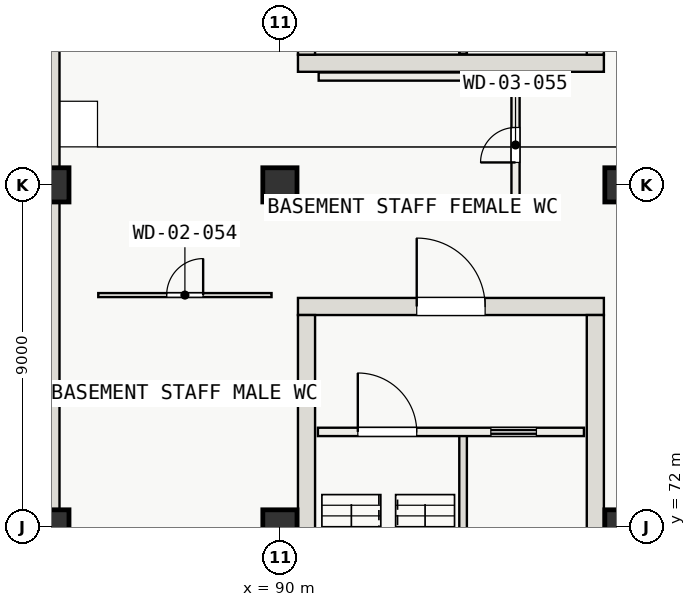
"""IFC4 building model, lengths in metres.
Left out: names, types, materials, properties, quantities, classifications, styles, units other than length and angle.
Written with IfcOpenShell. Run it as: python <this file> out.ifc"""

import sys

from ifc_helpers import new_model, si_unit, direction, frame, frame_2d, origin, origin_2d, place, context, subcontext, project, spatial, rectangle, extrude, element, fill, save


model = new_model("IFC4")
c1 = context("Model", 3, precision=1e-05, world=origin(), true_north=direction((0.0, 1.0)))
c2 = subcontext(c1, "Body", "Model", "MODEL_VIEW")
j1 = project(units=[si_unit("LENGTHUNIT", "METRE"), si_unit("PLANEANGLEUNIT", "RADIAN")], contexts=[c1])
p1 = place(None, origin())
s1 = spatial("IfcSite", under=j1, at=p1, CompositionType="ELEMENT")
p2 = place(p1, origin())
s2 = spatial("IfcBuilding", under=s1, at=p2, CompositionType="ELEMENT")
p3 = place(p2, frame((0.0, 0.0, -4.8)))
s3 = spatial("IfcBuildingStorey", under=s2, at=p3, CompositionType="ELEMENT", Elevation=-4.8)
p4 = place(p3, frame((90.475, 84.2, -0.45), z_axis=(0.0, 0.0, 1.0), x_axis=(1.0, 0.0, 0.0)))
e1 = element("IfcWall", 1, at=p4, inside=s3, PredefinedType="SHEAR", context=c2, shape_type="SweptSolid", body=[
    extrude(rectangle(XDim=8.05, YDim=0.45, at=frame_2d((4.025, 0.0))), origin(), (0.0, 0.0, 1.0), 5.25),
])
for number, where, z_axis, x_axis in (
    (2, (90.7, 84.425, -0.45), (0.0, 0.0, 1.0), (0.0, 1.0, 0.0)),
    (3, (98.3, 84.425, -0.45), (0.0, 0.0, 1.0), (0.0, 1.0, 0.0)),
):
    element("IfcWall", number, at=place(p3, frame(where, z_axis=z_axis, x_axis=x_axis)), inside=s3, PredefinedType="SHEAR", context=c2, shape_type="SweptSolid", body=[
        extrude(rectangle(XDim=11.15, YDim=0.45, at=frame_2d((5.575, 0.0))), origin(), (0.0, 0.0, 1.0), 5.25),
    ])
p5 = place(p3, frame((90.475, 77.8, -0.45), z_axis=(0.0, 0.0, 1.0), x_axis=(1.0, 0.0, 0.0)))
e4 = element("IfcWall", 4, at=p5, inside=s3, PredefinedType="SHEAR", context=c2, shape_type="SweptSolid", body=[
    extrude(rectangle(XDim=8.05, YDim=0.45, at=frame_2d((4.025, 0.0))), origin(), (0.0, 0.0, 1.0), 5.25),
])
p6 = place(p5, frame((3.125, 0.0, 0.45)))
e5 = element("IfcOpeningElement", 5, at=p6, cuts=e4, PredefinedType="OPENING", context=c2, shape_type="SweptSolid", body=[
    extrude(rectangle(XDim=1.8, YDim=2.3, at=frame_2d((0.9, 1.15))), frame((0.0, 0.235, 0.0), z_axis=(0.0, -1.0, 0.0), x_axis=(1.0, 0.0, 0.0)), (0.0, 0.0, 1.0), 0.47),
])
for number, where, z_axis, x_axis in (
    (6, (90.7, 66.425, -0.45), (0.0, 0.0, 1.0), (0.0, 1.0, 0.0)),
    (7, (98.3, 66.425, -0.45), (0.0, 0.0, 1.0), (0.0, 1.0, 0.0)),
):
    element("IfcWall", number, at=place(p3, frame(where, z_axis=z_axis, x_axis=x_axis)), inside=s3, PredefinedType="SHEAR", context=c2, shape_type="SweptSolid", body=[
        extrude(rectangle(XDim=11.15, YDim=0.45, at=frame_2d((5.575, 0.0))), origin(), (0.0, 0.0, 1.0), 5.25),
    ])
p7 = place(p3, frame((84.0, 72.0, -0.45), z_axis=(0.0, 0.0, 1.0), x_axis=(0.0, 1.0, 0.0)))
e8 = element("IfcWall", 8, at=p7, inside=s3, PredefinedType="USERDEFINED", context=c2, shape_type="SweptSolid", body=[
    extrude(rectangle(XDim=18.0, YDim=0.4, at=frame_2d((9.0, 0.0))), origin(), (0.0, 0.0, 1.0), 5.25),
])
for number, where, z_axis, x_axis in (
    (9, (84.0, 72.0, -0.45), (0.0, 0.0, 1.0), (1.0, 0.0, 0.0)),
    (10, (84.0, 81.0, -0.45), (0.0, 0.0, 1.0), (1.0, 0.0, 0.0)),
    (11, (90.0, 72.0, -0.45), (0.0, 0.0, 1.0), (1.0, 0.0, 0.0)),
    (12, (90.0, 81.0, -0.45), (0.0, 0.0, 1.0), (1.0, 0.0, 0.0)),
    (13, (99.0, 72.0, -0.45), (0.0, 0.0, 1.0), (1.0, 0.0, 0.0)),
    (14, (99.0, 81.0, -0.45), (0.0, 0.0, 1.0), (1.0, 0.0, 0.0)),
):
    element("IfcColumn", number, at=place(p3, frame(where, z_axis=z_axis, x_axis=x_axis)), inside=s3, PredefinedType="COLUMN", context=c2, shape_type="SweptSolid", body=[
        extrude(rectangle(XDim=0.9, YDim=0.9, at=origin_2d()), origin(), (0.0, 0.0, 1.0), 5.25),
    ])
for number, where, z_axis, x_axis in (
    (15, (94.82, 84.45, -0.45), (0.0, 0.0, 1.0), (0.0, 1.0, 0.0)),
    (16, (94.82, 66.45, -0.45), (0.0, 0.0, 1.0), (0.0, 1.0, 0.0)),
):
    element("IfcWall", number, at=place(p3, frame(where, z_axis=z_axis, x_axis=x_axis)), inside=s3, PredefinedType="SOLIDWALL", context=c2, shape_type="SweptSolid", body=[
        extrude(rectangle(XDim=8.0, YDim=0.2, at=frame_2d((4.0, 0.0))), origin(), (0.0, 0.0, 1.0), 5.25),
    ])
p8 = place(p3, frame((91.0, 74.5, 0.0), z_axis=(0.0, 0.0, 1.0), x_axis=(1.0, 0.0, 0.0)))
e17 = element("IfcWall", 17, at=p8, inside=s3, PredefinedType="SOLIDWALL", context=c2, shape_type="SweptSolid", body=[
    extrude(rectangle(XDim=7.0, YDim=0.22, at=frame_2d((3.5, 0.0))), origin(), (0.0, 0.0, 1.0), 4.4),
])
p9 = place(p8, frame((1.05, 0.0, 0.0)))
e18 = element("IfcOpeningElement", 18, at=p9, cuts=e17, PredefinedType="OPENING", context=c2, shape_type="SweptSolid", body=[
    extrude(rectangle(XDim=1.55, YDim=2.2, at=frame_2d((0.775, 1.1))), frame((0.0, 0.12, 0.0), z_axis=(0.0, -1.0, 0.0), x_axis=(1.0, 0.0, 0.0)), (0.0, 0.0, 1.0), 0.24),
])
p10 = place(p8, frame((4.55, 0.0, 0.0)))
e19 = element("IfcOpeningElement", 19, at=p10, cuts=e17, PredefinedType="OPENING", context=c2, shape_type="SweptSolid", body=[
    extrude(rectangle(XDim=1.2, YDim=2.2, at=frame_2d((0.6, 1.1))), frame((0.0, 0.12, 0.0), z_axis=(0.0, -1.0, 0.0), x_axis=(1.0, 0.0, 0.0)), (0.0, 0.0, 1.0), 0.24),
])
p11 = place(p3, frame((91.02, 83.85, 0.0), z_axis=(0.0, 0.0, 1.0), x_axis=(1.0, 0.0, 0.0)))
e20 = element("IfcWall", 20, at=p11, inside=s3, PredefinedType="PARTITIONING", context=c2, shape_type="SweptSolid", body=[
    extrude(rectangle(XDim=3.96, YDim=0.215, at=frame_2d((1.98, 0.0))), origin(), (0.0, 0.0, 1.0), 3.42),
])
p12 = place(p3, frame((85.22, 78.1, 0.0), z_axis=(0.0, 0.0, 1.0), x_axis=(1.0, 0.0, 0.0)))
e21 = element("IfcWall", 21, at=p12, inside=s3, PredefinedType="PARTITIONING", context=c2, shape_type="SweptSolid", body=[
    extrude(rectangle(XDim=4.56, YDim=0.105, at=frame_2d((2.28, 0.0))), origin(), (0.0, 0.0, 1.0), 3.42),
])
p13 = place(p12, frame((1.8, 0.0, 0.0)))
e22 = element("IfcOpeningElement", 22, at=p13, cuts=e21, PredefinedType="OPENING", context=c2, shape_type="SweptSolid", body=[
    extrude(rectangle(XDim=0.96, YDim=2.12, at=frame_2d((0.48, 1.06))), frame((0.0, 0.062, 0.0), z_axis=(0.0, -1.0, 0.0), x_axis=(1.0, 0.0, 0.0)), (0.0, 0.0, 1.0), 0.125),
])
p14 = place(p3, frame((96.2, 80.22, 0.0), z_axis=(0.0, 0.0, 1.0), x_axis=(0.0, 1.0, 0.0)))
e23 = element("IfcWall", 23, at=p14, inside=s3, PredefinedType="PARTITIONING", context=c2, shape_type="SweptSolid", body=[
    extrude(rectangle(XDim=3.66, YDim=0.215, at=frame_2d((1.83, 0.0))), origin(), (0.0, 0.0, 1.0), 3.42),
])
p15 = place(p14, frame((1.37, 0.0, 0.0)))
e24 = element("IfcOpeningElement", 24, at=p15, cuts=e23, PredefinedType="OPENING", context=c2, shape_type="SweptSolid", body=[
    extrude(rectangle(XDim=0.92, YDim=2.12, at=frame_2d((0.46, 1.06))), frame((0.0, 0.117, 0.0), z_axis=(0.0, -1.0, 0.0), x_axis=(1.0, 0.0, 0.0)), (0.0, 0.0, 1.0), 0.235),
])
p16 = place(p9, origin())
e25 = element("IfcDoor", 25, at=p16, inside=s3, OperationType="SINGLE_SWING_LEFT", PredefinedType="DOOR", context=c2, shape_type="SweptSolid", body=[
    extrude(rectangle(XDim=1.55, YDim=2.2, at=frame_2d((0.775, 1.1))), frame((0.0, 0.025, 0.0), z_axis=(0.0, -1.0, 0.0), x_axis=(1.0, 0.0, 0.0)), (0.0, 0.0, 1.0), 0.05),
])
fill(e18, e25)
p17 = place(p10, origin())
e26 = element("IfcDoor", 26, at=p17, inside=s3, OperationType="SLIDING_TO_LEFT", PredefinedType="DOOR", context=c2, shape_type="SweptSolid", body=[
    extrude(rectangle(XDim=1.2, YDim=2.2, at=frame_2d((0.6, 1.1))), frame((0.0, 0.025, 0.0), z_axis=(0.0, -1.0, 0.0), x_axis=(1.0, 0.0, 0.0)), (0.0, 0.0, 1.0), 0.05),
])
fill(e19, e26)
p18 = place(p6, origin())
e27 = element("IfcDoor", 27, at=p18, inside=s3, OperationType="DOUBLE_DOOR_SINGLE_SWING", PredefinedType="DOOR", context=c2, shape_type="SweptSolid", body=[
    extrude(rectangle(XDim=1.8, YDim=2.3, at=frame_2d((0.9, 1.15))), frame((0.0, 0.025, 0.0), z_axis=(0.0, -1.0, 0.0), x_axis=(1.0, 0.0, 0.0)), (0.0, 0.0, 1.0), 0.05),
])
fill(e5, e27)
p19 = place(p13, origin())
e28 = element("IfcDoor", 28, at=p19, inside=s3, OperationType="SINGLE_SWING_RIGHT", PredefinedType="DOOR", context=c2, shape_type="SweptSolid", body=[
    extrude(rectangle(XDim=0.96, YDim=2.12, at=frame_2d((0.48, 1.06))), frame((0.0, 0.025, 0.0), z_axis=(0.0, -1.0, 0.0), x_axis=(1.0, 0.0, 0.0)), (0.0, 0.0, 1.0), 0.05),
])
fill(e22, e28)
p20 = place(p15, origin())
e29 = element("IfcDoor", 29, at=p20, inside=s3, OperationType="SINGLE_SWING_LEFT", PredefinedType="DOOR", context=c2, shape_type="SweptSolid", body=[
    extrude(rectangle(XDim=0.92, YDim=2.12, at=frame_2d((0.46, 1.06))), frame((0.0, 0.025, 0.0), z_axis=(0.0, -1.0, 0.0), x_axis=(1.0, 0.0, 0.0)), (0.0, 0.0, 1.0), 0.05),
])
fill(e24, e29)
save(model, sys.argv[1])
